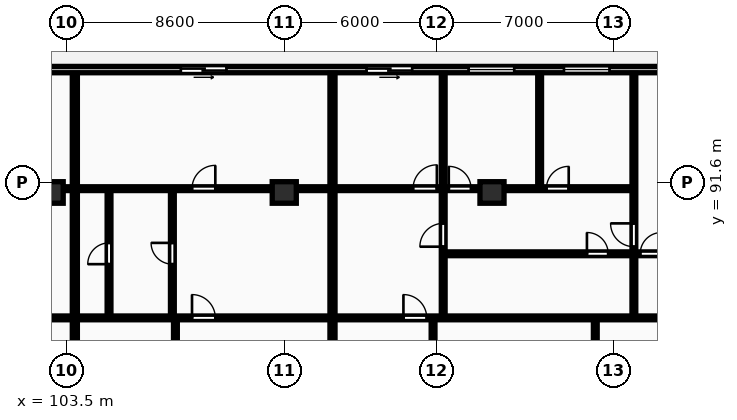
"""IFC4 building model, lengths in metres.
Left out: names, types, materials, properties, quantities, classifications, styles, units other than length and angle.
Written with IfcOpenShell. Run it as: python <this file> out.ifc"""

import sys

from ifc_helpers import new_model, si_unit, direction, frame, frame_2d, origin, origin_2d, place, context, subcontext, project, spatial, rectangle, extrude, element, fill, save


model = new_model("IFC4")
c1 = context("Model", 3, precision=1e-05, world=origin(), true_north=direction((0.0, 1.0)))
c2 = subcontext(c1, "Body", "Model", "MODEL_VIEW")
j1 = project(units=[si_unit("LENGTHUNIT", "METRE"), si_unit("PLANEANGLEUNIT", "RADIAN")], contexts=[c1])
p1 = place(None, origin())
s1 = spatial("IfcSite", under=j1, at=p1, CompositionType="ELEMENT")
p2 = place(p1, origin())
s2 = spatial("IfcBuilding", under=s1, at=p2, CompositionType="ELEMENT")
p3 = place(p2, frame((0.0, 0.0, 100.3)))
s3 = spatial("IfcBuildingStorey", under=s2, at=p3, CompositionType="ELEMENT", Elevation=100.3)
for number, where, z_axis, x_axis in (
    (1, (102.9, 91.2, 0.0), (0.0, 0.0, 1.0), (1.0, 0.0, 0.0)),
    (2, (112.1, 91.2, 0.0), (0.0, 0.0, 1.0), (1.0, 0.0, 0.0)),
    (3, (120.3, 91.2, 0.0), (0.0, 0.0, 1.0), (1.0, 0.0, 0.0)),
):
    element("IfcColumn", number, at=place(p3, frame(where, z_axis=z_axis, x_axis=x_axis)), inside=s3, PredefinedType="COLUMN", context=c2, shape_type="SweptSolid", body=[
        extrude(rectangle(XDim=0.95, YDim=0.85, at=origin_2d()), origin(), (0.0, 0.0, 1.0), 3.25),
    ])
p4 = place(p3, frame((130.6, 96.05, 0.0), z_axis=(0.0, 0.0, 1.0), x_axis=(-1.0, 0.0, 0.0)))
e4 = element("IfcWall", 4, at=p4, inside=s3, PredefinedType="STANDARD", context=c2, shape_type="SweptSolid", body=[
    extrude(rectangle(XDim=73.0, YDim=0.25, at=frame_2d((36.5, 0.0))), origin(), (0.0, 0.0, 1.0), 2.97),
])
p5 = place(p4, frame((68.242, 0.0, 0.0)))
e5 = element("IfcOpeningElement", 5, at=p5, cuts=e4, PredefinedType="OPENING", context=c2, shape_type="SweptSolid", body=[
    extrude(rectangle(XDim=1.8, YDim=2.2, at=frame_2d((0.9, 1.1))), frame((0.0, 0.135, 0.0), z_axis=(0.0, -1.0, 0.0), x_axis=(1.0, 0.0, 0.0)), (0.0, 0.0, 1.0), 0.27),
])
p6 = place(p4, frame((59.046, 0.0, 0.85)))
e6 = element("IfcOpeningElement", 6, at=p6, cuts=e4, PredefinedType="OPENING", context=c2, shape_type="SweptSolid", body=[
    extrude(rectangle(XDim=2.4, YDim=1.9, at=frame_2d((1.2, 0.95))), frame((0.0, 0.135, 0.0), z_axis=(0.0, -1.0, 0.0), x_axis=(1.0, 0.0, 0.0)), (0.0, 0.0, 1.0), 0.27),
])
p7 = place(p4, frame((50.012, 0.0, 0.0)))
e7 = element("IfcOpeningElement", 7, at=p7, cuts=e4, PredefinedType="OPENING", context=c2, shape_type="SweptSolid", body=[
    extrude(rectangle(XDim=1.8, YDim=2.2, at=frame_2d((0.9, 1.1))), frame((0.0, 0.135, 0.0), z_axis=(0.0, -1.0, 0.0), x_axis=(1.0, 0.0, 0.0)), (0.0, 0.0, 1.0), 0.27),
])
p8 = place(p4, frame((40.536, 0.0, 0.85)))
e8 = element("IfcOpeningElement", 8, at=p8, cuts=e4, PredefinedType="OPENING", context=c2, shape_type="SweptSolid", body=[
    extrude(rectangle(XDim=2.4, YDim=1.9, at=frame_2d((1.2, 0.95))), frame((0.0, 0.135, 0.0), z_axis=(0.0, -1.0, 0.0), x_axis=(1.0, 0.0, 0.0)), (0.0, 0.0, 1.0), 0.27),
])
p9 = place(p4, frame((30.67, 0.0, 0.0)))
e9 = element("IfcOpeningElement", 9, at=p9, cuts=e4, PredefinedType="OPENING", context=c2, shape_type="SweptSolid", body=[
    extrude(rectangle(XDim=1.8, YDim=2.2, at=frame_2d((0.9, 1.1))), frame((0.0, 0.135, 0.0), z_axis=(0.0, -1.0, 0.0), x_axis=(1.0, 0.0, 0.0)), (0.0, 0.0, 1.0), 0.27),
])
p10 = place(p4, frame((20.781, 0.0, 0.0)))
e10 = element("IfcOpeningElement", 10, at=p10, cuts=e4, PredefinedType="OPENING", context=c2, shape_type="SweptSolid", body=[
    extrude(rectangle(XDim=1.8, YDim=2.2, at=frame_2d((0.9, 1.1))), frame((0.0, 0.135, 0.0), z_axis=(0.0, -1.0, 0.0), x_axis=(1.0, 0.0, 0.0)), (0.0, 0.0, 1.0), 0.27),
])
p11 = place(p4, frame((9.423, 0.0, 0.85)))
e11 = element("IfcOpeningElement", 11, at=p11, cuts=e4, PredefinedType="OPENING", context=c2, shape_type="SweptSolid", body=[
    extrude(rectangle(XDim=1.8, YDim=1.8, at=frame_2d((0.9, 0.9))), frame((0.0, 0.135, 0.0), z_axis=(0.0, -1.0, 0.0), x_axis=(1.0, 0.0, 0.0)), (0.0, 0.0, 1.0), 0.27),
])
p12 = place(p4, frame((5.66, 0.0, 0.85)))
e12 = element("IfcOpeningElement", 12, at=p12, cuts=e4, PredefinedType="OPENING", context=c2, shape_type="SweptSolid", body=[
    extrude(rectangle(XDim=1.8, YDim=1.8, at=frame_2d((0.9, 0.9))), frame((0.0, 0.135, 0.0), z_axis=(0.0, -1.0, 0.0), x_axis=(1.0, 0.0, 0.0)), (0.0, 0.0, 1.0), 0.27),
])
p13 = place(p4, frame((13.451, 0.0, 0.0)))
e13 = element("IfcOpeningElement", 13, at=p13, cuts=e4, PredefinedType="OPENING", context=c2, shape_type="SweptSolid", body=[
    extrude(rectangle(XDim=1.8, YDim=2.2, at=frame_2d((0.9, 1.1))), frame((0.0, 0.135, 0.0), z_axis=(0.0, -1.0, 0.0), x_axis=(1.0, 0.0, 0.0)), (0.0, 0.0, 1.0), 0.27),
])
p14 = place(p4, frame((1.21, 0.0, 0.85)))
e14 = element("IfcOpeningElement", 14, at=p14, cuts=e4, PredefinedType="OPENING", context=c2, shape_type="SweptSolid", body=[
    extrude(rectangle(XDim=2.4, YDim=1.9, at=frame_2d((1.2, 0.95))), frame((0.0, 0.135, 0.0), z_axis=(0.0, -1.0, 0.0), x_axis=(1.0, 0.0, 0.0)), (0.0, 0.0, 1.0), 0.27),
])
p15 = place(p3, frame((103.834, 69.83, 0.0), z_axis=(0.0, 0.0, 1.0), x_axis=(0.0, 1.0, 0.0)))
e15 = element("IfcWall", 15, at=p15, inside=s3, PredefinedType="PARTITIONING", context=c2, shape_type="SweptSolid", body=[
    extrude(rectangle(XDim=26.07, YDim=0.2, at=frame_2d((13.035, 0.0))), origin(), (0.0, 0.0, 1.0), 2.97),
])
p16 = place(p3, frame((94.305, 86.25, 0.0), z_axis=(0.0, 0.0, 1.0), x_axis=(1.0, 0.0, 0.0)))
e16 = element("IfcWall", 16, at=p16, inside=s3, PredefinedType="PARTITIONING", context=c2, shape_type="SweptSolid", body=[
    extrude(rectangle(XDim=9.449, YDim=0.15, at=frame_2d((4.725, 0.0))), origin(), (0.0, 0.0, 1.0), 2.97),
])
p17 = place(p16, frame((4.264, 0.0, 0.0)))
e17 = element("IfcOpeningElement", 17, at=p17, cuts=e16, PredefinedType="OPENING", context=c2, shape_type="SweptSolid", body=[
    extrude(rectangle(XDim=0.92, YDim=2.08, at=frame_2d((0.46, 1.04))), frame((0.0, 0.085, 0.0), z_axis=(0.0, -1.0, 0.0), x_axis=(1.0, 0.0, 0.0)), (0.0, 0.0, 1.0), 0.17),
])
p18 = place(p3, frame((94.305, 91.35, 0.0), z_axis=(0.0, 0.0, 1.0), x_axis=(1.0, 0.0, 0.0)))
e18 = element("IfcWall", 18, at=p18, inside=s3, PredefinedType="PARTITIONING", context=c2, shape_type="SweptSolid", body=[
    extrude(rectangle(XDim=9.449, YDim=0.15, at=frame_2d((4.725, 0.0))), origin(), (0.0, 0.0, 1.0), 2.663),
])
p19 = place(p18, frame((4.264, 0.0, 0.0)))
e19 = element("IfcOpeningElement", 19, at=p19, cuts=e18, PredefinedType="OPENING", context=c2, shape_type="SweptSolid", body=[
    extrude(rectangle(XDim=0.92, YDim=2.08, at=frame_2d((0.46, 1.04))), frame((0.0, 0.085, 0.0), z_axis=(0.0, -1.0, 0.0), x_axis=(1.0, 0.0, 0.0)), (0.0, 0.0, 1.0), 0.17),
])
p20 = place(p3, frame((114.004, 69.83, 0.0), z_axis=(0.0, 0.0, 1.0), x_axis=(0.0, 1.0, 0.0)))
e20 = element("IfcWall", 20, at=p20, inside=s3, PredefinedType="PARTITIONING", context=c2, shape_type="SweptSolid", body=[
    extrude(rectangle(XDim=26.07, YDim=0.2, at=frame_2d((13.035, 0.0))), origin(), (0.0, 0.0, 1.0), 2.97),
])
p21 = place(p3, frame((107.804, 69.81, 0.0), z_axis=(0.0, 0.0, 1.0), x_axis=(0.0, 1.0, 0.0)))
e21 = element("IfcWall", 21, at=p21, inside=s3, PredefinedType="PARTITIONING", context=c2, shape_type="SweptSolid", body=[
    extrude(rectangle(XDim=16.4, YDim=0.15, at=frame_2d((8.2, 0.0))), origin(), (0.0, 0.0, 1.0), 2.97),
])
p22 = place(p21, frame((7.07, 0.0, 0.0)))
e22 = element("IfcOpeningElement", 22, at=p22, cuts=e21, PredefinedType="OPENING", context=c2, shape_type="SweptSolid", body=[
    extrude(rectangle(XDim=0.88, YDim=2.06, at=frame_2d((0.44, 1.03))), frame((0.0, 0.085, 0.0), z_axis=(0.0, -1.0, 0.0), x_axis=(1.0, 0.0, 0.0)), (0.0, 0.0, 1.0), 0.17),
])
p23 = place(p3, frame((105.184, 86.29, 0.0), z_axis=(0.0, 0.0, 1.0), x_axis=(0.0, 1.0, 0.0)))
e23 = element("IfcWall", 23, at=p23, inside=s3, PredefinedType="PARTITIONING", context=c2, shape_type="SweptSolid", body=[
    extrude(rectangle(XDim=5.0, YDim=0.15, at=frame_2d((2.5, 0.0))), origin(), (0.0, 0.0, 1.0), 2.97),
])
p24 = place(p23, frame((2.08, 0.0, 0.0)))
e24 = element("IfcOpeningElement", 24, at=p24, cuts=e23, PredefinedType="OPENING", context=c2, shape_type="SweptSolid", body=[
    extrude(rectangle(XDim=0.84, YDim=2.04, at=frame_2d((0.42, 1.02))), frame((0.0, 0.085, 0.0), z_axis=(0.0, -1.0, 0.0), x_axis=(1.0, 0.0, 0.0)), (0.0, 0.0, 1.0), 0.17),
])
p25 = place(p3, frame((107.684, 86.29, 0.0), z_axis=(0.0, 0.0, 1.0), x_axis=(0.0, 1.0, 0.0)))
e25 = element("IfcWall", 25, at=p25, inside=s3, PredefinedType="PARTITIONING", context=c2, shape_type="SweptSolid", body=[
    extrude(rectangle(XDim=5.0, YDim=0.15, at=frame_2d((2.5, 0.0))), origin(), (0.0, 0.0, 1.0), 2.97),
])
p26 = place(p25, frame((2.08, 0.0, 0.0)))
e26 = element("IfcOpeningElement", 26, at=p26, cuts=e25, PredefinedType="OPENING", context=c2, shape_type="SweptSolid", body=[
    extrude(rectangle(XDim=0.84, YDim=2.04, at=frame_2d((0.42, 1.02))), frame((0.0, 0.085, 0.0), z_axis=(0.0, -1.0, 0.0), x_axis=(1.0, 0.0, 0.0)), (0.0, 0.0, 1.0), 0.17),
])
p27 = place(p3, frame((103.914, 86.25, 0.0), z_axis=(0.0, 0.0, 1.0), x_axis=(1.0, 0.0, 0.0)))
e27 = element("IfcWall", 27, at=p27, inside=s3, PredefinedType="PARTITIONING", context=c2, shape_type="SweptSolid", body=[
    extrude(rectangle(XDim=10.01, YDim=0.15, at=frame_2d((5.005, 0.0))), origin(), (0.0, 0.0, 1.0), 2.97),
])
p28 = place(p27, frame((4.545, 0.0, 0.0)))
e28 = element("IfcOpeningElement", 28, at=p28, cuts=e27, PredefinedType="OPENING", context=c2, shape_type="SweptSolid", body=[
    extrude(rectangle(XDim=0.92, YDim=2.08, at=frame_2d((0.46, 1.04))), frame((0.0, 0.085, 0.0), z_axis=(0.0, -1.0, 0.0), x_axis=(1.0, 0.0, 0.0)), (0.0, 0.0, 1.0), 0.17),
])
p29 = place(p3, frame((103.914, 91.35, 0.0), z_axis=(0.0, 0.0, 1.0), x_axis=(1.0, 0.0, 0.0)))
e29 = element("IfcWall", 29, at=p29, inside=s3, PredefinedType="PARTITIONING", context=c2, shape_type="SweptSolid", body=[
    extrude(rectangle(XDim=10.01, YDim=0.15, at=frame_2d((5.005, 0.0))), origin(), (0.0, 0.0, 1.0), 2.663),
])
p30 = place(p29, frame((4.545, 0.0, 0.0)))
e30 = element("IfcOpeningElement", 30, at=p30, cuts=e29, PredefinedType="OPENING", context=c2, shape_type="SweptSolid", body=[
    extrude(rectangle(XDim=0.92, YDim=2.08, at=frame_2d((0.46, 1.04))), frame((0.0, 0.085, 0.0), z_axis=(0.0, -1.0, 0.0), x_axis=(1.0, 0.0, 0.0)), (0.0, 0.0, 1.0), 0.17),
])
p31 = place(p3, frame((124.377, 69.81, 0.0), z_axis=(0.0, 0.0, 1.0), x_axis=(0.0, 1.0, 0.0)))
e31 = element("IfcWall", 31, at=p31, inside=s3, PredefinedType="PARTITIONING", context=c2, shape_type="SweptSolid", body=[
    extrude(rectangle(XDim=16.4, YDim=0.15, at=frame_2d((8.2, 0.0))), origin(), (0.0, 0.0, 1.0), 2.97),
])
p32 = place(p31, frame((7.29, 0.0, 0.0)))
e32 = element("IfcOpeningElement", 32, at=p32, cuts=e31, PredefinedType="OPENING", context=c2, shape_type="SweptSolid", body=[
    extrude(rectangle(XDim=0.84, YDim=2.04, at=frame_2d((0.42, 1.02))), frame((0.0, 0.085, 0.0), z_axis=(0.0, -1.0, 0.0), x_axis=(1.0, 0.0, 0.0)), (0.0, 0.0, 1.0), 0.17),
])
p33 = place(p31, frame((8.63, 0.0, 0.0)))
e33 = element("IfcOpeningElement", 33, at=p33, cuts=e31, PredefinedType="OPENING", context=c2, shape_type="SweptSolid", body=[
    extrude(rectangle(XDim=0.88, YDim=2.06, at=frame_2d((0.44, 1.03))), frame((0.0, 0.085, 0.0), z_axis=(0.0, -1.0, 0.0), x_axis=(1.0, 0.0, 0.0)), (0.0, 0.0, 1.0), 0.17),
])
p34 = place(p3, frame((117.974, 69.81, 0.0), z_axis=(0.0, 0.0, 1.0), x_axis=(0.0, 1.0, 0.0)))
e34 = element("IfcWall", 34, at=p34, inside=s3, PredefinedType="PARTITIONING", context=c2, shape_type="SweptSolid", body=[
    extrude(rectangle(XDim=16.4, YDim=0.15, at=frame_2d((8.2, 0.0))), origin(), (0.0, 0.0, 1.0), 2.97),
])
p35 = place(p34, frame((7.25, 0.0, 0.0)))
e35 = element("IfcOpeningElement", 35, at=p35, cuts=e34, PredefinedType="OPENING", context=c2, shape_type="SweptSolid", body=[
    extrude(rectangle(XDim=0.88, YDim=2.06, at=frame_2d((0.44, 1.03))), frame((0.0, 0.085, 0.0), z_axis=(0.0, -1.0, 0.0), x_axis=(1.0, 0.0, 0.0)), (0.0, 0.0, 1.0), 0.17),
])
p36 = place(p3, frame((122.18, 91.43, 0.0), z_axis=(0.0, 0.0, 1.0), x_axis=(0.0, 1.0, 0.0)))
e36 = element("IfcWall", 36, at=p36, inside=s3, PredefinedType="PARTITIONING", context=c2, shape_type="SweptSolid", body=[
    extrude(rectangle(XDim=4.47, YDim=0.15, at=frame_2d((2.235, 0.0))), origin(), (0.0, 0.0, 1.0), 2.97),
])
p37 = place(p3, frame((118.374, 86.29, 0.0), z_axis=(0.0, 0.0, 1.0), x_axis=(0.0, 1.0, 0.0)))
e37 = element("IfcWall", 37, at=p37, inside=s3, PredefinedType="PARTITIONING", context=c2, shape_type="SweptSolid", body=[
    extrude(rectangle(XDim=9.61, YDim=0.15, at=frame_2d((4.805, 0.0))), origin(), (0.0, 0.0, 1.0), 2.97),
])
p38 = place(p37, frame((2.77, 0.0, 0.0)))
e38 = element("IfcOpeningElement", 38, at=p38, cuts=e37, PredefinedType="OPENING", context=c2, shape_type="SweptSolid", body=[
    extrude(rectangle(XDim=0.92, YDim=2.08, at=frame_2d((0.46, 1.04))), frame((0.0, 0.085, 0.0), z_axis=(0.0, -1.0, 0.0), x_axis=(1.0, 0.0, 0.0)), (0.0, 0.0, 1.0), 0.17),
])
p39 = place(p3, frame((125.9, 86.29, 0.0), z_axis=(0.0, 0.0, 1.0), x_axis=(0.0, 1.0, 0.0)))
e39 = element("IfcWall", 39, at=p39, inside=s3, PredefinedType="PARTITIONING", context=c2, shape_type="SweptSolid", body=[
    extrude(rectangle(XDim=2.47, YDim=0.15, at=frame_2d((1.235, 0.0))), origin(), (0.0, 0.0, 1.0), 2.97),
])
p40 = place(p3, frame((125.9, 88.8, 0.0), z_axis=(0.0, 0.0, 1.0), x_axis=(0.0, 1.0, 0.0)))
e40 = element("IfcWall", 40, at=p40, inside=s3, PredefinedType="PARTITIONING", context=c2, shape_type="SweptSolid", body=[
    extrude(rectangle(XDim=7.1, YDim=0.15, at=frame_2d((3.55, 0.0))), origin(), (0.0, 0.0, 1.0), 2.97),
])
p41 = place(p40, frame((0.26, 0.0, 0.0)))
e41 = element("IfcOpeningElement", 41, at=p41, cuts=e40, PredefinedType="OPENING", context=c2, shape_type="SweptSolid", body=[
    extrude(rectangle(XDim=0.92, YDim=2.08, at=frame_2d((0.46, 1.04))), frame((0.0, 0.085, 0.0), z_axis=(0.0, -1.0, 0.0), x_axis=(1.0, 0.0, 0.0)), (0.0, 0.0, 1.0), 0.17),
])
p42 = place(p3, frame((118.414, 88.78, 0.0), z_axis=(0.0, 0.0, 1.0), x_axis=(1.0, 0.0, 0.0)))
e42 = element("IfcWall", 42, at=p42, inside=s3, PredefinedType="PARTITIONING", context=c2, shape_type="SweptSolid", body=[
    extrude(rectangle(XDim=12.106, YDim=0.15, at=frame_2d((6.053, 0.0))), origin(), (0.0, 0.0, 1.0), 2.97),
])
p43 = place(p42, frame((5.633, 0.0, 0.0)))
e43 = element("IfcOpeningElement", 43, at=p43, cuts=e42, PredefinedType="OPENING", context=c2, shape_type="SweptSolid", body=[
    extrude(rectangle(XDim=0.84, YDim=2.04, at=frame_2d((0.42, 1.02))), frame((0.0, 0.085, 0.0), z_axis=(0.0, -1.0, 0.0), x_axis=(1.0, 0.0, 0.0)), (0.0, 0.0, 1.0), 0.17),
])
p44 = place(p42, frame((7.736, 0.0, 0.0)))
e44 = element("IfcOpeningElement", 44, at=p44, cuts=e42, PredefinedType="OPENING", context=c2, shape_type="SweptSolid", body=[
    extrude(rectangle(XDim=0.84, YDim=2.04, at=frame_2d((0.42, 1.02))), frame((0.0, 0.085, 0.0), z_axis=(0.0, -1.0, 0.0), x_axis=(1.0, 0.0, 0.0)), (0.0, 0.0, 1.0), 0.17),
])
p45 = place(p3, frame((114.084, 86.25, 0.0), z_axis=(0.0, 0.0, 1.0), x_axis=(1.0, 0.0, 0.0)))
e45 = element("IfcWall", 45, at=p45, inside=s3, PredefinedType="PARTITIONING", context=c2, shape_type="SweptSolid", body=[
    extrude(rectangle(XDim=16.436, YDim=0.15, at=frame_2d((8.218, 0.0))), origin(), (0.0, 0.0, 1.0), 2.97),
])
p46 = place(p45, frame((2.72, 0.0, 0.0)))
e46 = element("IfcOpeningElement", 46, at=p46, cuts=e45, PredefinedType="OPENING", context=c2, shape_type="SweptSolid", body=[
    extrude(rectangle(XDim=0.92, YDim=2.08, at=frame_2d((0.46, 1.04))), frame((0.0, 0.085, 0.0), z_axis=(0.0, -1.0, 0.0), x_axis=(1.0, 0.0, 0.0)), (0.0, 0.0, 1.0), 0.17),
])
p47 = place(p3, frame((114.084, 91.35, 0.0), z_axis=(0.0, 0.0, 1.0), x_axis=(1.0, 0.0, 0.0)))
e47 = element("IfcWall", 47, at=p47, inside=s3, PredefinedType="PARTITIONING", context=c2, shape_type="SweptSolid", body=[
    extrude(rectangle(XDim=11.816, YDim=0.15, at=frame_2d((5.908, 0.0))), origin(), (0.0, 0.0, 1.0), 2.663),
])
p48 = place(p47, frame((3.1, 0.0, 0.0)))
e48 = element("IfcOpeningElement", 48, at=p48, cuts=e47, PredefinedType="OPENING", context=c2, shape_type="SweptSolid", body=[
    extrude(rectangle(XDim=0.94, YDim=2.1, at=frame_2d((0.47, 1.05))), frame((0.0, 0.085, 0.0), z_axis=(0.0, -1.0, 0.0), x_axis=(1.0, 0.0, 0.0)), (0.0, 0.0, 1.0), 0.17),
])
p49 = place(p47, frame((4.51, 0.0, 0.0)))
e49 = element("IfcOpeningElement", 49, at=p49, cuts=e47, PredefinedType="OPENING", context=c2, shape_type="SweptSolid", body=[
    extrude(rectangle(XDim=0.88, YDim=2.06, at=frame_2d((0.44, 1.03))), frame((0.0, 0.085, 0.0), z_axis=(0.0, -1.0, 0.0), x_axis=(1.0, 0.0, 0.0)), (0.0, 0.0, 1.0), 0.17),
])
p50 = place(p47, frame((8.364, 0.0, 0.0)))
e50 = element("IfcOpeningElement", 50, at=p50, cuts=e47, PredefinedType="OPENING", context=c2, shape_type="SweptSolid", body=[
    extrude(rectangle(XDim=0.88, YDim=2.06, at=frame_2d((0.44, 1.03))), frame((0.0, 0.085, 0.0), z_axis=(0.0, -1.0, 0.0), x_axis=(1.0, 0.0, 0.0)), (0.0, 0.0, 1.0), 0.17),
])
p51 = place(p10, origin())
e51 = element("IfcDoor", 51, at=p51, inside=s3, OperationType="SLIDING_TO_LEFT", PredefinedType="DOOR", context=c2, shape_type="SweptSolid", body=[
    extrude(rectangle(XDim=1.8, YDim=2.2, at=frame_2d((0.9, 1.1))), frame((0.0, 0.025, 0.0), z_axis=(0.0, -1.0, 0.0), x_axis=(1.0, 0.0, 0.0)), (0.0, 0.0, 1.0), 0.05),
])
fill(e10, e51)
p52 = place(p11, origin())
e52 = element("IfcWindow", 52, at=p52, inside=s3, PartitioningType="SINGLE_PANEL", PredefinedType="WINDOW", context=c2, shape_type="SweptSolid", body=[
    extrude(rectangle(XDim=1.8, YDim=1.8, at=frame_2d((0.9, 0.9))), frame((0.0, 0.03, 0.0), z_axis=(0.0, -1.0, 0.0), x_axis=(1.0, 0.0, 0.0)), (0.0, 0.0, 1.0), 0.06),
])
fill(e11, e52)
p53 = place(p12, origin())
e53 = element("IfcWindow", 53, at=p53, inside=s3, PartitioningType="SINGLE_PANEL", PredefinedType="WINDOW", context=c2, shape_type="SweptSolid", body=[
    extrude(rectangle(XDim=1.8, YDim=1.8, at=frame_2d((0.9, 0.9))), frame((0.0, 0.03, 0.0), z_axis=(0.0, -1.0, 0.0), x_axis=(1.0, 0.0, 0.0)), (0.0, 0.0, 1.0), 0.06),
])
fill(e12, e53)
p54 = place(p13, origin())
e54 = element("IfcDoor", 54, at=p54, inside=s3, OperationType="SLIDING_TO_LEFT", PredefinedType="DOOR", context=c2, shape_type="SweptSolid", body=[
    extrude(rectangle(XDim=1.8, YDim=2.2, at=frame_2d((0.9, 1.1))), frame((0.0, 0.025, 0.0), z_axis=(0.0, -1.0, 0.0), x_axis=(1.0, 0.0, 0.0)), (0.0, 0.0, 1.0), 0.05),
])
fill(e13, e54)
p55 = place(p24, origin())
e55 = element("IfcDoor", 55, at=p55, inside=s3, OperationType="SINGLE_SWING_LEFT", PredefinedType="DOOR", context=c2, shape_type="SweptSolid", body=[
    extrude(rectangle(XDim=0.84, YDim=2.04, at=frame_2d((0.42, 1.02))), frame((0.0, 0.025, 0.0), z_axis=(0.0, -1.0, 0.0), x_axis=(1.0, 0.0, 0.0)), (0.0, 0.0, 1.0), 0.05),
])
fill(e24, e55)
p56 = place(p26, origin())
e56 = element("IfcDoor", 56, at=p56, inside=s3, OperationType="SINGLE_SWING_RIGHT", PredefinedType="DOOR", context=c2, shape_type="SweptSolid", body=[
    extrude(rectangle(XDim=0.84, YDim=2.04, at=frame_2d((0.42, 1.02))), frame((0.0, 0.025, 0.0), z_axis=(0.0, -1.0, 0.0), x_axis=(1.0, 0.0, 0.0)), (0.0, 0.0, 1.0), 0.05),
])
fill(e26, e56)
p57 = place(p28, origin())
e57 = element("IfcDoor", 57, at=p57, inside=s3, OperationType="SINGLE_SWING_LEFT", PredefinedType="DOOR", context=c2, shape_type="SweptSolid", body=[
    extrude(rectangle(XDim=0.92, YDim=2.08, at=frame_2d((0.46, 1.04))), frame((0.0, 0.025, 0.0), z_axis=(0.0, -1.0, 0.0), x_axis=(1.0, 0.0, 0.0)), (0.0, 0.0, 1.0), 0.05),
])
fill(e28, e57)
p58 = place(p30, origin())
e58 = element("IfcDoor", 58, at=p58, inside=s3, OperationType="SINGLE_SWING_RIGHT", PredefinedType="DOOR", context=c2, shape_type="SweptSolid", body=[
    extrude(rectangle(XDim=0.92, YDim=2.08, at=frame_2d((0.46, 1.04))), frame((0.0, 0.025, 0.0), z_axis=(0.0, -1.0, 0.0), x_axis=(1.0, 0.0, 0.0)), (0.0, 0.0, 1.0), 0.05),
])
fill(e30, e58)
p59 = place(p38, origin())
e59 = element("IfcDoor", 59, at=p59, inside=s3, OperationType="SINGLE_SWING_LEFT", PredefinedType="DOOR", context=c2, shape_type="SweptSolid", body=[
    extrude(rectangle(XDim=0.92, YDim=2.08, at=frame_2d((0.46, 1.04))), frame((0.0, 0.025, 0.0), z_axis=(0.0, -1.0, 0.0), x_axis=(1.0, 0.0, 0.0)), (0.0, 0.0, 1.0), 0.05),
])
fill(e38, e59)
p60 = place(p41, origin())
e60 = element("IfcDoor", 60, at=p60, inside=s3, OperationType="SINGLE_SWING_RIGHT", PredefinedType="DOOR", context=c2, shape_type="SweptSolid", body=[
    extrude(rectangle(XDim=0.92, YDim=2.08, at=frame_2d((0.46, 1.04))), frame((0.0, 0.025, 0.0), z_axis=(0.0, -1.0, 0.0), x_axis=(1.0, 0.0, 0.0)), (0.0, 0.0, 1.0), 0.05),
])
fill(e41, e60)
p61 = place(p43, origin())
e61 = element("IfcDoor", 61, at=p61, inside=s3, OperationType="SINGLE_SWING_LEFT", PredefinedType="DOOR", context=c2, shape_type="SweptSolid", body=[
    extrude(rectangle(XDim=0.84, YDim=2.04, at=frame_2d((0.42, 1.02))), frame((0.0, 0.025, 0.0), z_axis=(0.0, -1.0, 0.0), x_axis=(1.0, 0.0, 0.0)), (0.0, 0.0, 1.0), 0.05),
])
fill(e43, e61)
p62 = place(p44, origin())
e62 = element("IfcDoor", 62, at=p62, inside=s3, OperationType="SINGLE_SWING_RIGHT", PredefinedType="DOOR", context=c2, shape_type="SweptSolid", body=[
    extrude(rectangle(XDim=0.84, YDim=2.04, at=frame_2d((0.42, 1.02))), frame((0.0, 0.025, 0.0), z_axis=(0.0, -1.0, 0.0), x_axis=(1.0, 0.0, 0.0)), (0.0, 0.0, 1.0), 0.05),
])
fill(e44, e62)
p63 = place(p46, origin())
e63 = element("IfcDoor", 63, at=p63, inside=s3, OperationType="SINGLE_SWING_LEFT", PredefinedType="DOOR", context=c2, shape_type="SweptSolid", body=[
    extrude(rectangle(XDim=0.92, YDim=2.08, at=frame_2d((0.46, 1.04))), frame((0.0, 0.025, 0.0), z_axis=(0.0, -1.0, 0.0), x_axis=(1.0, 0.0, 0.0)), (0.0, 0.0, 1.0), 0.05),
])
fill(e46, e63)
p64 = place(p48, origin())
e64 = element("IfcDoor", 64, at=p64, inside=s3, OperationType="SINGLE_SWING_RIGHT", PredefinedType="DOOR", context=c2, shape_type="SweptSolid", body=[
    extrude(rectangle(XDim=0.94, YDim=2.1, at=frame_2d((0.47, 1.05))), frame((0.0, 0.025, 0.0), z_axis=(0.0, -1.0, 0.0), x_axis=(1.0, 0.0, 0.0)), (0.0, 0.0, 1.0), 0.05),
])
fill(e48, e64)
p65 = place(p49, origin())
e65 = element("IfcDoor", 65, at=p65, inside=s3, OperationType="SINGLE_SWING_LEFT", PredefinedType="DOOR", context=c2, shape_type="SweptSolid", body=[
    extrude(rectangle(XDim=0.88, YDim=2.06, at=frame_2d((0.44, 1.03))), frame((0.0, 0.025, 0.0), z_axis=(0.0, -1.0, 0.0), x_axis=(1.0, 0.0, 0.0)), (0.0, 0.0, 1.0), 0.05),
])
fill(e49, e65)
p66 = place(p50, origin())
e66 = element("IfcDoor", 66, at=p66, inside=s3, OperationType="SINGLE_SWING_RIGHT", PredefinedType="DOOR", context=c2, shape_type="SweptSolid", body=[
    extrude(rectangle(XDim=0.88, YDim=2.06, at=frame_2d((0.44, 1.03))), frame((0.0, 0.025, 0.0), z_axis=(0.0, -1.0, 0.0), x_axis=(1.0, 0.0, 0.0)), (0.0, 0.0, 1.0), 0.05),
])
fill(e50, e66)
save(model, sys.argv[1])
